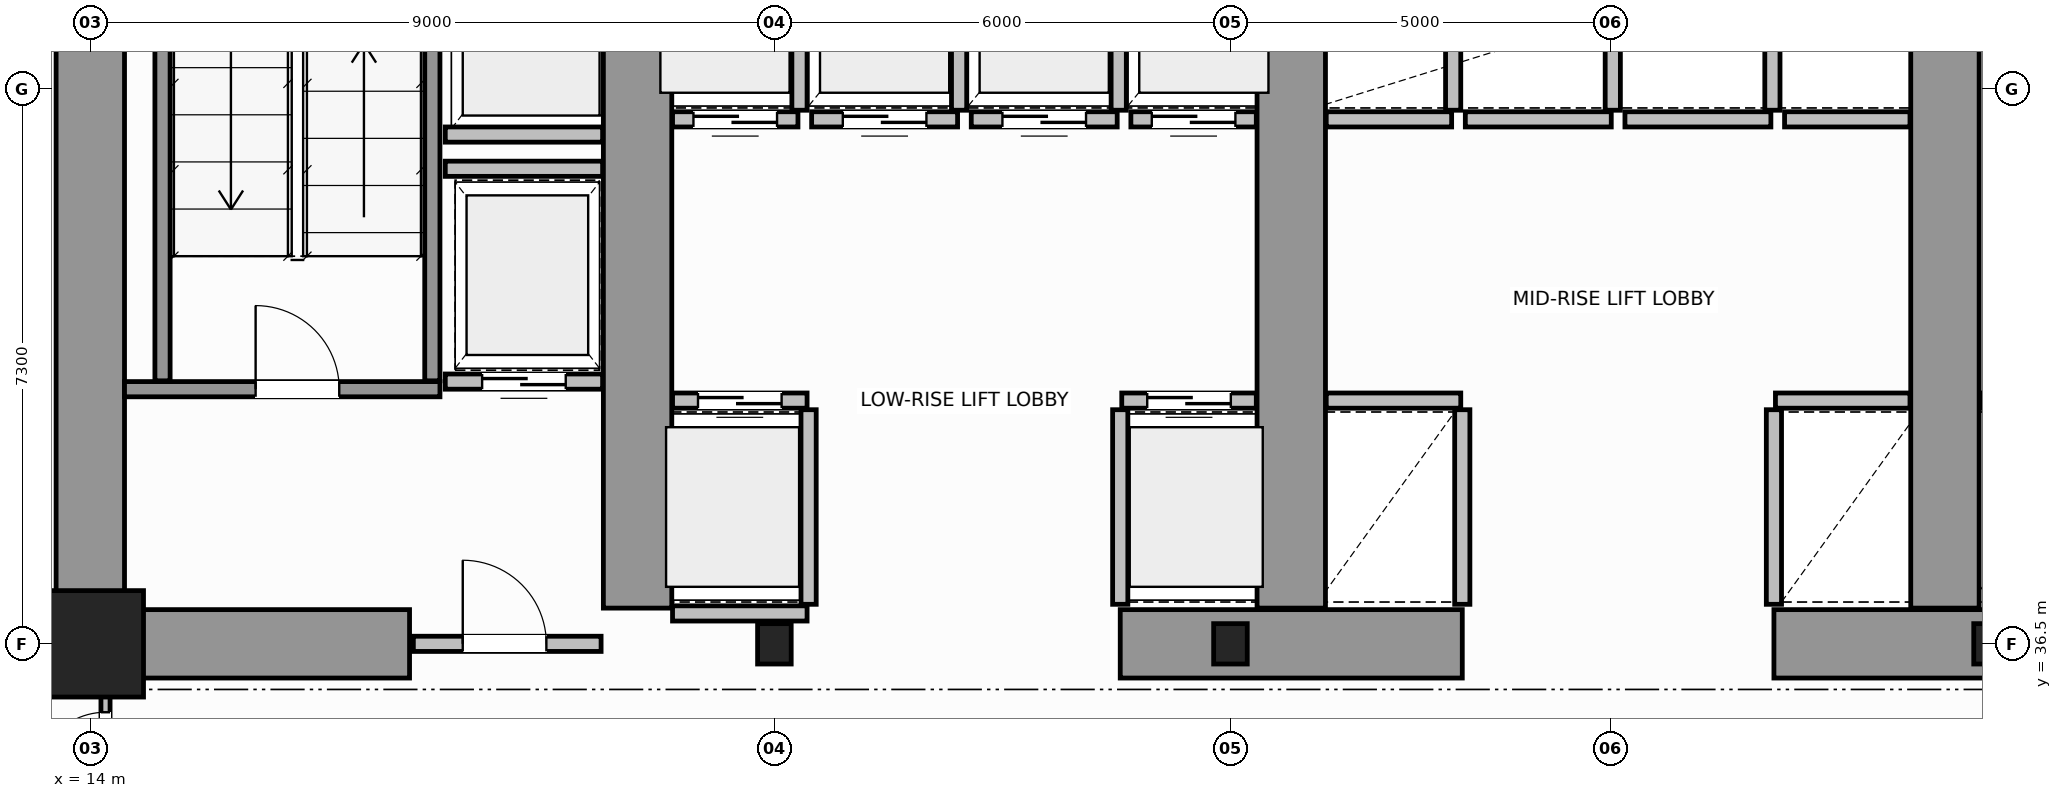
"""IFC4 building model, lengths in metres.
Left out: names, types, materials, properties, quantities, classifications, styles, units other than length and angle.
Written with IfcOpenShell. Run it as: python <this file> out.ifc"""

import sys

from ifc_helpers import new_model, si_unit, direction, frame, frame_2d, origin, origin_2d, place, context, subcontext, project, spatial, rectangle, i_section, extrude, source, transform, mapped, element, fill, save


model = new_model("IFC4")
c1 = context("Model", 3, precision=1e-05, world=origin(), true_north=direction((0.0, 1.0)))
c2 = subcontext(c1, "Body", "Model", "MODEL_VIEW")
j1 = project(units=[si_unit("LENGTHUNIT", "METRE"), si_unit("PLANEANGLEUNIT", "RADIAN")], contexts=[c1])
p1 = place(None, origin())
s1 = spatial("IfcSite", under=j1, at=p1, CompositionType="ELEMENT")
p2 = place(p1, origin())
s2 = spatial("IfcBuilding", under=s1, at=p2, CompositionType="ELEMENT")
p3 = place(p2, frame((0.0, 0.0, 75.8)))
s3 = spatial("IfcBuildingStorey", under=s2, at=p3, CompositionType="ELEMENT", Elevation=75.8)
m1 = source(origin(), c2, "Body", "SweptSolid", [
    extrude(rectangle(XDim=1.4, YDim=1.4, at=origin_2d()), origin(), (0.0, 0.0, 1.0), 3.8),
])
p4 = place(p3, frame((14.0, 36.5, 0.0), z_axis=(0.0, 0.0, 1.0), x_axis=(1.0, 0.0, 0.0)))
e1 = element("IfcColumn", 1, at=p4, inside=s3, PredefinedType="COLUMN", context=c2, shape_type="MappedRepresentation", body=[
    mapped(m1, transform((0.0, 0.0, 0.0), scale=1.0)),
])
m2 = source(origin(), c2, "Body", "SweptSolid", [
    extrude(i_section(OverallWidth=0.442, OverallDepth=0.531, WebThickness=0.065, FlangeThickness=0.076, FilletRadius=0.015, at=origin_2d()), origin(), (0.0, 0.0, 1.0), 3.8),
])
for number, where, z_axis, x_axis in (
    (2, (23.0, 36.5, 0.0), (0.0, 0.0, 1.0), (1.0, 0.0, 0.0)),
    (3, (29.0, 36.5, 0.0), (0.0, 0.0, 1.0), (1.0, 0.0, 0.0)),
    (4, (39.0, 36.5, 0.0), (0.0, 0.0, 1.0), (1.0, 0.0, 0.0)),
):
    element("IfcColumn", number, at=place(p3, frame(where, z_axis=z_axis, x_axis=x_axis)), inside=s3, PredefinedType="COLUMN", context=c2, shape_type="MappedRepresentation", body=[
        mapped(m2, transform((0.0, 0.0, 0.0), scale=1.0)),
    ])
p5 = place(p3, frame((14.0, 36.5, 0.0), z_axis=(0.0, 0.0, 1.0), x_axis=(0.0, 1.0, 0.0)))
e5 = element("IfcWall", 5, at=p5, inside=s3, PredefinedType="SHEAR", context=c2, shape_type="SweptSolid", body=[
    extrude(rectangle(XDim=14.5, YDim=0.9, at=frame_2d((7.25, 0.0))), origin(), (0.0, 0.0, 1.0), 3.8),
])
p6 = place(p3, frame((14.47, 36.5, 0.0), z_axis=(0.0, 0.0, 1.0), x_axis=(1.0, 0.0, 0.0)))
e6 = element("IfcWall", 6, at=p6, inside=s3, PredefinedType="SHEAR", context=c2, shape_type="SweptSolid", body=[
    extrude(rectangle(XDim=3.73, YDim=0.9, at=frame_2d((1.865, 0.0))), origin(), (0.0, 0.0, 1.0), 2.38),
])
for number, where, z_axis, x_axis in (
    (7, (27.55, 36.5, 0.0), (0.0, 0.0, 1.0), (1.0, 0.0, 0.0)),
    (8, (36.15, 36.5, 0.0), (0.0, 0.0, 1.0), (1.0, 0.0, 0.0)),
):
    element("IfcWall", number, at=place(p3, frame(where, z_axis=z_axis, x_axis=x_axis)), inside=s3, PredefinedType="SHEAR", context=c2, shape_type="SweptSolid", body=[
        extrude(rectangle(XDim=4.5, YDim=0.9, at=frame_2d((2.25, 0.0))), origin(), (0.0, 0.0, 1.0), 3.8),
    ])
for number, where, z_axis, x_axis in (
    (9, (21.2, 36.97, 0.0), (0.0, 0.0, 1.0), (0.0, 1.0, 0.0)),
    (10, (29.8, 36.97, 0.0), (0.0, 0.0, 1.0), (0.0, 1.0, 0.0)),
    (11, (38.4, 36.97, 0.0), (0.0, 0.0, 1.0), (0.0, 1.0, 0.0)),
):
    element("IfcWall", number, at=place(p3, frame(where, z_axis=z_axis, x_axis=x_axis)), inside=s3, PredefinedType="SHEAR", context=c2, shape_type="SweptSolid", body=[
        extrude(rectangle(XDim=9.23, YDim=0.9, at=frame_2d((4.615, 0.0))), origin(), (0.0, 0.0, 1.0), 3.8),
    ])
p7 = place(p3, frame((14.45, 39.85, 0.0), z_axis=(0.0, 0.0, 1.0), x_axis=(1.0, 0.0, 0.0)))
e12 = element("IfcWall", 12, at=p7, inside=s3, PredefinedType="SOLIDWALL", context=c2, shape_type="SweptSolid", body=[
    extrude(rectangle(XDim=4.15, YDim=0.2, at=frame_2d((2.075, 0.0))), origin(), (0.0, 0.0, 1.0), 3.8),
])
p8 = place(p7, frame((1.725, 0.0, 0.0)))
e13 = element("IfcOpeningElement", 13, at=p8, cuts=e12, PredefinedType="OPENING", context=c2, shape_type="SweptSolid", body=[
    extrude(rectangle(XDim=1.1, YDim=2.15, at=frame_2d((0.55, 1.075))), frame((0.0, 0.11, 0.0), z_axis=(0.0, -1.0, 0.0), x_axis=(1.0, 0.0, 0.0)), (0.0, 0.0, 1.0), 0.22),
])
for number, where, z_axis, x_axis in (
    (14, (14.95, 39.96, 0.0), (0.0, 0.0, 1.0), (0.0, 1.0, 0.0)),
    (15, (18.5, 39.96, 0.0), (0.0, 0.0, 1.0), (0.0, 1.0, 0.0)),
):
    element("IfcWall", number, at=place(p3, frame(where, z_axis=z_axis, x_axis=x_axis)), inside=s3, PredefinedType="SOLIDWALL", context=c2, shape_type="SweptSolid", body=[
        extrude(rectangle(XDim=9.93, YDim=0.2, at=frame_2d((4.965, 0.0))), origin(), (0.0, 0.0, 1.0), 3.8),
    ])
p9 = place(p3, frame((18.25, 36.5, 0.0), z_axis=(0.0, 0.0, 1.0), x_axis=(1.0, 0.0, 0.0)))
e16 = element("IfcWall", 16, at=p9, inside=s3, PredefinedType="SOLIDWALL", context=c2, shape_type="SweptSolid", body=[
    extrude(rectangle(XDim=2.47, YDim=0.2, at=frame_2d((1.235, 0.0))), origin(), (0.0, 0.0, 1.0), 2.37),
])
p10 = place(p9, frame((0.65, 0.0, 0.0)))
e17 = element("IfcOpeningElement", 17, at=p10, cuts=e16, PredefinedType="OPENING", context=c2, shape_type="SweptSolid", body=[
    extrude(rectangle(XDim=1.1, YDim=2.15, at=frame_2d((0.55, 1.075))), frame((0.0, 0.11, 0.0), z_axis=(0.0, -1.0, 0.0), x_axis=(1.0, 0.0, 0.0)), (0.0, 0.0, 1.0), 0.22),
])
p11 = place(p3, frame((21.66, 39.7, 0.0), z_axis=(0.0, 0.0, 1.0), x_axis=(1.0, 0.0, 0.0)))
e18 = element("IfcWall", 18, at=p11, inside=s3, PredefinedType="SOLIDWALL", context=c2, shape_type="SweptSolid", body=[
    extrude(rectangle(XDim=1.77, YDim=0.2, at=frame_2d((0.885, 0.0))), origin(), (0.0, 0.0, 1.0), 3.58),
])
p12 = place(p11, frame((0.335, 0.0, 0.0)))
e19 = element("IfcOpeningElement", 19, at=p12, cuts=e18, PredefinedType="OPENING", context=c2, shape_type="SweptSolid", body=[
    extrude(rectangle(XDim=1.1, YDim=2.15, at=frame_2d((0.55, 1.075))), frame((0.0, 0.11, 0.0), z_axis=(0.0, -1.0, 0.0), x_axis=(1.0, 0.0, 0.0)), (0.0, 0.0, 1.0), 0.22),
])
p13 = place(p3, frame((21.66, 36.9, 0.0), z_axis=(0.0, 0.0, 1.0), x_axis=(1.0, 0.0, 0.0)))
e20 = element("IfcWall", 20, at=p13, inside=s3, PredefinedType="SOLIDWALL", context=c2, shape_type="SweptSolid", body=[
    extrude(rectangle(XDim=1.77, YDim=0.2, at=frame_2d((0.885, 0.0))), origin(), (0.0, 0.0, 1.0), 2.37),
])
p14 = place(p3, frame((23.45, 37.02, 0.0), z_axis=(0.0, 0.0, 1.0), x_axis=(0.0, 1.0, 0.0)))
e21 = element("IfcWall", 21, at=p14, inside=s3, PredefinedType="SOLIDWALL", context=c2, shape_type="SweptSolid", body=[
    extrude(rectangle(XDim=2.56, YDim=0.2, at=frame_2d((1.28, 0.0))), origin(), (0.0, 0.0, 1.0), 3.58),
])
p15 = place(p3, frame((27.57, 39.7, 0.0), z_axis=(0.0, 0.0, 1.0), x_axis=(1.0, 0.0, 0.0)))
e22 = element("IfcWall", 22, at=p15, inside=s3, PredefinedType="SOLIDWALL", context=c2, shape_type="SweptSolid", body=[
    extrude(rectangle(XDim=1.77, YDim=0.2, at=frame_2d((0.885, 0.0))), origin(), (0.0, 0.0, 1.0), 3.58),
])
p16 = place(p15, frame((0.335, 0.0, 0.0)))
e23 = element("IfcOpeningElement", 23, at=p16, cuts=e22, PredefinedType="OPENING", context=c2, shape_type="SweptSolid", body=[
    extrude(rectangle(XDim=1.1, YDim=2.15, at=frame_2d((0.55, 1.075))), frame((0.0, 0.11, 0.0), z_axis=(0.0, -1.0, 0.0), x_axis=(1.0, 0.0, 0.0)), (0.0, 0.0, 1.0), 0.22),
])
p17 = place(p3, frame((27.55, 37.02, 0.0), z_axis=(0.0, 0.0, 1.0), x_axis=(0.0, 1.0, 0.0)))
e24 = element("IfcWall", 24, at=p17, inside=s3, PredefinedType="SOLIDWALL", context=c2, shape_type="SweptSolid", body=[
    extrude(rectangle(XDim=2.56, YDim=0.2, at=frame_2d((1.28, 0.0))), origin(), (0.0, 0.0, 1.0), 3.58),
])
p18 = place(p3, frame((21.66, 43.4, 0.0), z_axis=(0.0, 0.0, 1.0), x_axis=(1.0, 0.0, 0.0)))
e25 = element("IfcWall", 25, at=p18, inside=s3, PredefinedType="SOLIDWALL", context=c2, shape_type="SweptSolid", body=[
    extrude(rectangle(XDim=1.65, YDim=0.2, at=frame_2d((0.825, 0.0))), origin(), (0.0, 0.0, 1.0), 3.58),
])
p19 = place(p18, frame((0.275, 0.0, 0.0)))
e26 = element("IfcOpeningElement", 26, at=p19, cuts=e25, PredefinedType="OPENING", context=c2, shape_type="SweptSolid", body=[
    extrude(rectangle(XDim=1.1, YDim=2.15, at=frame_2d((0.55, 1.075))), frame((0.0, 0.11, 0.0), z_axis=(0.0, -1.0, 0.0), x_axis=(1.0, 0.0, 0.0)), (0.0, 0.0, 1.0), 0.22),
])
p20 = place(p3, frame((23.33, 43.52, 0.0), z_axis=(0.0, 0.0, 1.0), x_axis=(0.0, 1.0, 0.0)))
e27 = element("IfcWall", 27, at=p20, inside=s3, PredefinedType="SOLIDWALL", context=c2, shape_type="SweptSolid", body=[
    extrude(rectangle(XDim=2.56, YDim=0.2, at=frame_2d((1.28, 0.0))), origin(), (0.0, 0.0, 1.0), 3.58),
])
p21 = place(p3, frame((23.49, 43.4, 0.0), z_axis=(0.0, 0.0, 1.0), x_axis=(1.0, 0.0, 0.0)))
e28 = element("IfcWall", 28, at=p21, inside=s3, PredefinedType="SOLIDWALL", context=c2, shape_type="SweptSolid", body=[
    extrude(rectangle(XDim=1.92, YDim=0.2, at=frame_2d((0.96, 0.0))), origin(), (0.0, 0.0, 1.0), 3.58),
])
p22 = place(p21, frame((0.41, 0.0, 0.0)))
e29 = element("IfcOpeningElement", 29, at=p22, cuts=e28, PredefinedType="OPENING", context=c2, shape_type="SweptSolid", body=[
    extrude(rectangle(XDim=1.1, YDim=2.15, at=frame_2d((0.55, 1.075))), frame((0.0, 0.11, 0.0), z_axis=(0.0, -1.0, 0.0), x_axis=(1.0, 0.0, 0.0)), (0.0, 0.0, 1.0), 0.22),
])
p23 = place(p3, frame((25.43, 43.52, 0.0), z_axis=(0.0, 0.0, 1.0), x_axis=(0.0, 1.0, 0.0)))
e30 = element("IfcWall", 30, at=p23, inside=s3, PredefinedType="SOLIDWALL", context=c2, shape_type="SweptSolid", body=[
    extrude(rectangle(XDim=2.56, YDim=0.2, at=frame_2d((1.28, 0.0))), origin(), (0.0, 0.0, 1.0), 3.58),
])
p24 = place(p3, frame((25.59, 43.4, 0.0), z_axis=(0.0, 0.0, 1.0), x_axis=(1.0, 0.0, 0.0)))
e31 = element("IfcWall", 31, at=p24, inside=s3, PredefinedType="SOLIDWALL", context=c2, shape_type="SweptSolid", body=[
    extrude(rectangle(XDim=1.92, YDim=0.2, at=frame_2d((0.96, 0.0))), origin(), (0.0, 0.0, 1.0), 3.58),
])
p25 = place(p24, frame((0.41, 0.0, 0.0)))
e32 = element("IfcOpeningElement", 32, at=p25, cuts=e31, PredefinedType="OPENING", context=c2, shape_type="SweptSolid", body=[
    extrude(rectangle(XDim=1.1, YDim=2.15, at=frame_2d((0.55, 1.075))), frame((0.0, 0.11, 0.0), z_axis=(0.0, -1.0, 0.0), x_axis=(1.0, 0.0, 0.0)), (0.0, 0.0, 1.0), 0.22),
])
p26 = place(p3, frame((27.53, 43.52, 0.0), z_axis=(0.0, 0.0, 1.0), x_axis=(0.0, 1.0, 0.0)))
e33 = element("IfcWall", 33, at=p26, inside=s3, PredefinedType="SOLIDWALL", context=c2, shape_type="SweptSolid", body=[
    extrude(rectangle(XDim=2.56, YDim=0.2, at=frame_2d((1.28, 0.0))), origin(), (0.0, 0.0, 1.0), 3.58),
])
p27 = place(p3, frame((27.69, 43.4, 0.0), z_axis=(0.0, 0.0, 1.0), x_axis=(1.0, 0.0, 0.0)))
e34 = element("IfcWall", 34, at=p27, inside=s3, PredefinedType="SOLIDWALL", context=c2, shape_type="SweptSolid", body=[
    extrude(rectangle(XDim=1.65, YDim=0.2, at=frame_2d((0.825, 0.0))), origin(), (0.0, 0.0, 1.0), 3.58),
])
p28 = place(p27, frame((0.275, 0.0, 0.0)))
e35 = element("IfcOpeningElement", 35, at=p28, cuts=e34, PredefinedType="OPENING", context=c2, shape_type="SweptSolid", body=[
    extrude(rectangle(XDim=1.1, YDim=2.15, at=frame_2d((0.55, 1.075))), frame((0.0, 0.11, 0.0), z_axis=(0.0, -1.0, 0.0), x_axis=(1.0, 0.0, 0.0)), (0.0, 0.0, 1.0), 0.22),
])
p29 = place(p3, frame((30.26, 39.7, 0.0), z_axis=(0.0, 0.0, 1.0), x_axis=(1.0, 0.0, 0.0)))
e36 = element("IfcWall", 36, at=p29, inside=s3, PredefinedType="SOLIDWALL", context=c2, shape_type="SweptSolid", body=[
    extrude(rectangle(XDim=1.77, YDim=0.2, at=frame_2d((0.885, 0.0))), origin(), (0.0, 0.0, 1.0), 3.58),
])
p30 = place(p3, frame((32.05, 37.02, 0.0), z_axis=(0.0, 0.0, 1.0), x_axis=(0.0, 1.0, 0.0)))
e37 = element("IfcWall", 37, at=p30, inside=s3, PredefinedType="SOLIDWALL", context=c2, shape_type="SweptSolid", body=[
    extrude(rectangle(XDim=2.56, YDim=0.2, at=frame_2d((1.28, 0.0))), origin(), (0.0, 0.0, 1.0), 3.58),
])
p31 = place(p3, frame((36.17, 39.7, 0.0), z_axis=(0.0, 0.0, 1.0), x_axis=(1.0, 0.0, 0.0)))
e38 = element("IfcWall", 38, at=p31, inside=s3, PredefinedType="SOLIDWALL", context=c2, shape_type="SweptSolid", body=[
    extrude(rectangle(XDim=1.77, YDim=0.2, at=frame_2d((0.885, 0.0))), origin(), (0.0, 0.0, 1.0), 3.58),
])
p32 = place(p3, frame((36.15, 37.02, 0.0), z_axis=(0.0, 0.0, 1.0), x_axis=(0.0, 1.0, 0.0)))
e39 = element("IfcWall", 39, at=p32, inside=s3, PredefinedType="SOLIDWALL", context=c2, shape_type="SweptSolid", body=[
    extrude(rectangle(XDim=2.56, YDim=0.2, at=frame_2d((1.28, 0.0))), origin(), (0.0, 0.0, 1.0), 3.58),
])
p33 = place(p3, frame((30.26, 43.4, 0.0), z_axis=(0.0, 0.0, 1.0), x_axis=(1.0, 0.0, 0.0)))
e40 = element("IfcWall", 40, at=p33, inside=s3, PredefinedType="SOLIDWALL", context=c2, shape_type="SweptSolid", body=[
    extrude(rectangle(XDim=1.65, YDim=0.2, at=frame_2d((0.825, 0.0))), origin(), (0.0, 0.0, 1.0), 3.58),
])
p34 = place(p3, frame((31.93, 43.52, 0.0), z_axis=(0.0, 0.0, 1.0), x_axis=(0.0, 1.0, 0.0)))
e41 = element("IfcWall", 41, at=p34, inside=s3, PredefinedType="SOLIDWALL", context=c2, shape_type="SweptSolid", body=[
    extrude(rectangle(XDim=2.56, YDim=0.2, at=frame_2d((1.28, 0.0))), origin(), (0.0, 0.0, 1.0), 3.58),
])
p35 = place(p3, frame((32.09, 43.4, 0.0), z_axis=(0.0, 0.0, 1.0), x_axis=(1.0, 0.0, 0.0)))
e42 = element("IfcWall", 42, at=p35, inside=s3, PredefinedType="SOLIDWALL", context=c2, shape_type="SweptSolid", body=[
    extrude(rectangle(XDim=1.92, YDim=0.2, at=frame_2d((0.96, 0.0))), origin(), (0.0, 0.0, 1.0), 3.58),
])
p36 = place(p3, frame((34.03, 43.52, 0.0), z_axis=(0.0, 0.0, 1.0), x_axis=(0.0, 1.0, 0.0)))
e43 = element("IfcWall", 43, at=p36, inside=s3, PredefinedType="SOLIDWALL", context=c2, shape_type="SweptSolid", body=[
    extrude(rectangle(XDim=2.56, YDim=0.2, at=frame_2d((1.28, 0.0))), origin(), (0.0, 0.0, 1.0), 3.58),
])
p37 = place(p3, frame((34.19, 43.4, 0.0), z_axis=(0.0, 0.0, 1.0), x_axis=(1.0, 0.0, 0.0)))
e44 = element("IfcWall", 44, at=p37, inside=s3, PredefinedType="SOLIDWALL", context=c2, shape_type="SweptSolid", body=[
    extrude(rectangle(XDim=1.92, YDim=0.2, at=frame_2d((0.96, 0.0))), origin(), (0.0, 0.0, 1.0), 3.58),
])
p38 = place(p3, frame((36.13, 43.52, 0.0), z_axis=(0.0, 0.0, 1.0), x_axis=(0.0, 1.0, 0.0)))
e45 = element("IfcWall", 45, at=p38, inside=s3, PredefinedType="SOLIDWALL", context=c2, shape_type="SweptSolid", body=[
    extrude(rectangle(XDim=2.56, YDim=0.2, at=frame_2d((1.28, 0.0))), origin(), (0.0, 0.0, 1.0), 3.58),
])
p39 = place(p3, frame((36.29, 43.4, 0.0), z_axis=(0.0, 0.0, 1.0), x_axis=(1.0, 0.0, 0.0)))
e46 = element("IfcWall", 46, at=p39, inside=s3, PredefinedType="SOLIDWALL", context=c2, shape_type="SweptSolid", body=[
    extrude(rectangle(XDim=1.65, YDim=0.2, at=frame_2d((0.825, 0.0))), origin(), (0.0, 0.0, 1.0), 3.58),
])
p40 = place(p3, frame((38.86, 39.7, 0.0), z_axis=(0.0, 0.0, 1.0), x_axis=(1.0, 0.0, 0.0)))
e47 = element("IfcWall", 47, at=p40, inside=s3, PredefinedType="SOLIDWALL", context=c2, shape_type="SweptSolid", body=[
    extrude(rectangle(XDim=1.77, YDim=0.2, at=frame_2d((0.885, 0.0))), origin(), (0.0, 0.0, 1.0), 3.58),
])
p41 = place(p3, frame((18.67, 43.2, 0.0), z_axis=(0.0, 0.0, 1.0), x_axis=(1.0, 0.0, 0.0)))
e48 = element("IfcWall", 48, at=p41, inside=s3, PredefinedType="SOLIDWALL", context=c2, shape_type="SweptSolid", body=[
    extrude(rectangle(XDim=2.07, YDim=0.2, at=frame_2d((1.035, 0.0))), origin(), (0.0, 0.0, 1.0), 3.58),
])
p42 = place(p3, frame((18.67, 39.95, 0.0), z_axis=(0.0, 0.0, 1.0), x_axis=(1.0, 0.0, 0.0)))
e49 = element("IfcWall", 49, at=p42, inside=s3, PredefinedType="SOLIDWALL", context=c2, shape_type="SweptSolid", body=[
    extrude(rectangle(XDim=2.07, YDim=0.2, at=frame_2d((1.035, 0.0))), origin(), (0.0, 0.0, 1.0), 3.58),
])
p43 = place(p42, frame((0.485, 0.0, 0.0)))
e50 = element("IfcOpeningElement", 50, at=p43, cuts=e49, PredefinedType="OPENING", context=c2, shape_type="SweptSolid", body=[
    extrude(rectangle(XDim=1.1, YDim=2.15, at=frame_2d((0.55, 1.075))), frame((0.0, 0.11, 0.0), z_axis=(0.0, -1.0, 0.0), x_axis=(1.0, 0.0, 0.0)), (0.0, 0.0, 1.0), 0.22),
])
p44 = place(p3, frame((18.67, 42.75, 0.0), z_axis=(0.0, 0.0, 1.0), x_axis=(1.0, 0.0, 0.0)))
e51 = element("IfcWall", 51, at=p44, inside=s3, PredefinedType="SOLIDWALL", context=c2, shape_type="SweptSolid", body=[
    extrude(rectangle(XDim=2.07, YDim=0.2, at=frame_2d((1.035, 0.0))), origin(), (0.0, 0.0, 1.0), 3.58),
])
p45 = place(p3, frame((14.2, 34.0, 0.0), z_axis=(0.0, 0.0, 1.0), x_axis=(0.0, 1.0, 0.0)))
e52 = element("IfcWall", 52, at=p45, inside=s3, PredefinedType="PARTITIONING", context=c2, shape_type="SweptSolid", body=[
    extrude(rectangle(XDim=2.44, YDim=0.12, at=frame_2d((1.22, 0.0))), origin(), (0.0, 0.0, 1.0), 3.58),
])
p46 = place(p45, frame((0.7, 0.0, 0.0)))
e53 = element("IfcOpeningElement", 53, at=p46, cuts=e52, PredefinedType="OPENING", context=c2, shape_type="SweptSolid", body=[
    extrude(rectangle(XDim=0.9, YDim=2.15, at=frame_2d((0.45, 1.075))), frame((0.0, 0.07, 0.0), z_axis=(0.0, -1.0, 0.0), x_axis=(1.0, 0.0, 0.0)), (0.0, 0.0, 1.0), 0.14),
])
m3 = source(origin(), c2, "Body", "SweptSolid", [
    extrude(rectangle(XDim=1.1, YDim=2.15, at=frame_2d((0.55, 1.075))), frame((0.0, 0.025, 0.0), z_axis=(0.0, -1.0, 0.0), x_axis=(1.0, 0.0, 0.0)), (0.0, 0.0, 1.0), 0.05),
])
p47 = place(p8, origin())
e54 = element("IfcDoor", 54, at=p47, inside=s3, OperationType="SINGLE_SWING_LEFT", PredefinedType="DOOR", context=c2, shape_type="MappedRepresentation", body=[
    mapped(m3, transform((0.0, 0.0, 0.0), scale=1.0)),
])
fill(e13, e54)
p48 = place(p10, origin())
e55 = element("IfcDoor", 55, at=p48, inside=s3, OperationType="SINGLE_SWING_RIGHT", PredefinedType="DOOR", context=c2, shape_type="MappedRepresentation", body=[
    mapped(m3, transform((0.0, 0.0, 0.0), scale=1.0)),
])
fill(e17, e55)
p49 = place(p12, origin())
e56 = element("IfcDoor", 56, at=p49, inside=s3, OperationType="DOUBLE_DOOR_SLIDING", PredefinedType="DOOR", context=c2, shape_type="MappedRepresentation", body=[
    mapped(m3, transform((0.0, 0.0, 0.0), scale=1.0)),
])
fill(e19, e56)
p50 = place(p16, origin())
e57 = element("IfcDoor", 57, at=p50, inside=s3, OperationType="DOUBLE_DOOR_SLIDING", PredefinedType="DOOR", context=c2, shape_type="MappedRepresentation", body=[
    mapped(m3, transform((0.0, 0.0, 0.0), scale=1.0)),
])
fill(e23, e57)
p51 = place(p19, origin())
e58 = element("IfcDoor", 58, at=p51, inside=s3, OperationType="DOUBLE_DOOR_SLIDING", PredefinedType="DOOR", context=c2, shape_type="MappedRepresentation", body=[
    mapped(m3, transform((0.0, 0.0, 0.0), scale=1.0)),
])
fill(e26, e58)
p52 = place(p22, origin())
e59 = element("IfcDoor", 59, at=p52, inside=s3, OperationType="DOUBLE_DOOR_SLIDING", PredefinedType="DOOR", context=c2, shape_type="MappedRepresentation", body=[
    mapped(m3, transform((0.0, 0.0, 0.0), scale=1.0)),
])
fill(e29, e59)
p53 = place(p25, origin())
e60 = element("IfcDoor", 60, at=p53, inside=s3, OperationType="DOUBLE_DOOR_SLIDING", PredefinedType="DOOR", context=c2, shape_type="MappedRepresentation", body=[
    mapped(m3, transform((0.0, 0.0, 0.0), scale=1.0)),
])
fill(e32, e60)
p54 = place(p28, origin())
e61 = element("IfcDoor", 61, at=p54, inside=s3, OperationType="DOUBLE_DOOR_SLIDING", PredefinedType="DOOR", context=c2, shape_type="MappedRepresentation", body=[
    mapped(m3, transform((0.0, 0.0, 0.0), scale=1.0)),
])
fill(e35, e61)
p55 = place(p43, origin())
e62 = element("IfcDoor", 62, at=p55, inside=s3, OperationType="DOUBLE_DOOR_SLIDING", PredefinedType="DOOR", context=c2, shape_type="MappedRepresentation", body=[
    mapped(m3, transform((0.0, 0.0, 0.0), scale=1.0)),
])
fill(e50, e62)
m4 = source(origin(), c2, "Body", "SweptSolid", [
    extrude(rectangle(XDim=0.9, YDim=2.15, at=frame_2d((0.45, 1.075))), frame((0.0, 0.025, 0.0), z_axis=(0.0, -1.0, 0.0), x_axis=(1.0, 0.0, 0.0)), (0.0, 0.0, 1.0), 0.05),
])
p56 = place(p46, origin())
e63 = element("IfcDoor", 63, at=p56, inside=s3, OperationType="SINGLE_SWING_LEFT", PredefinedType="DOOR", context=c2, shape_type="MappedRepresentation", body=[
    mapped(m4, transform((0.0, 0.0, 0.0), scale=1.0)),
])
fill(e53, e63)
save(model, sys.argv[1])
